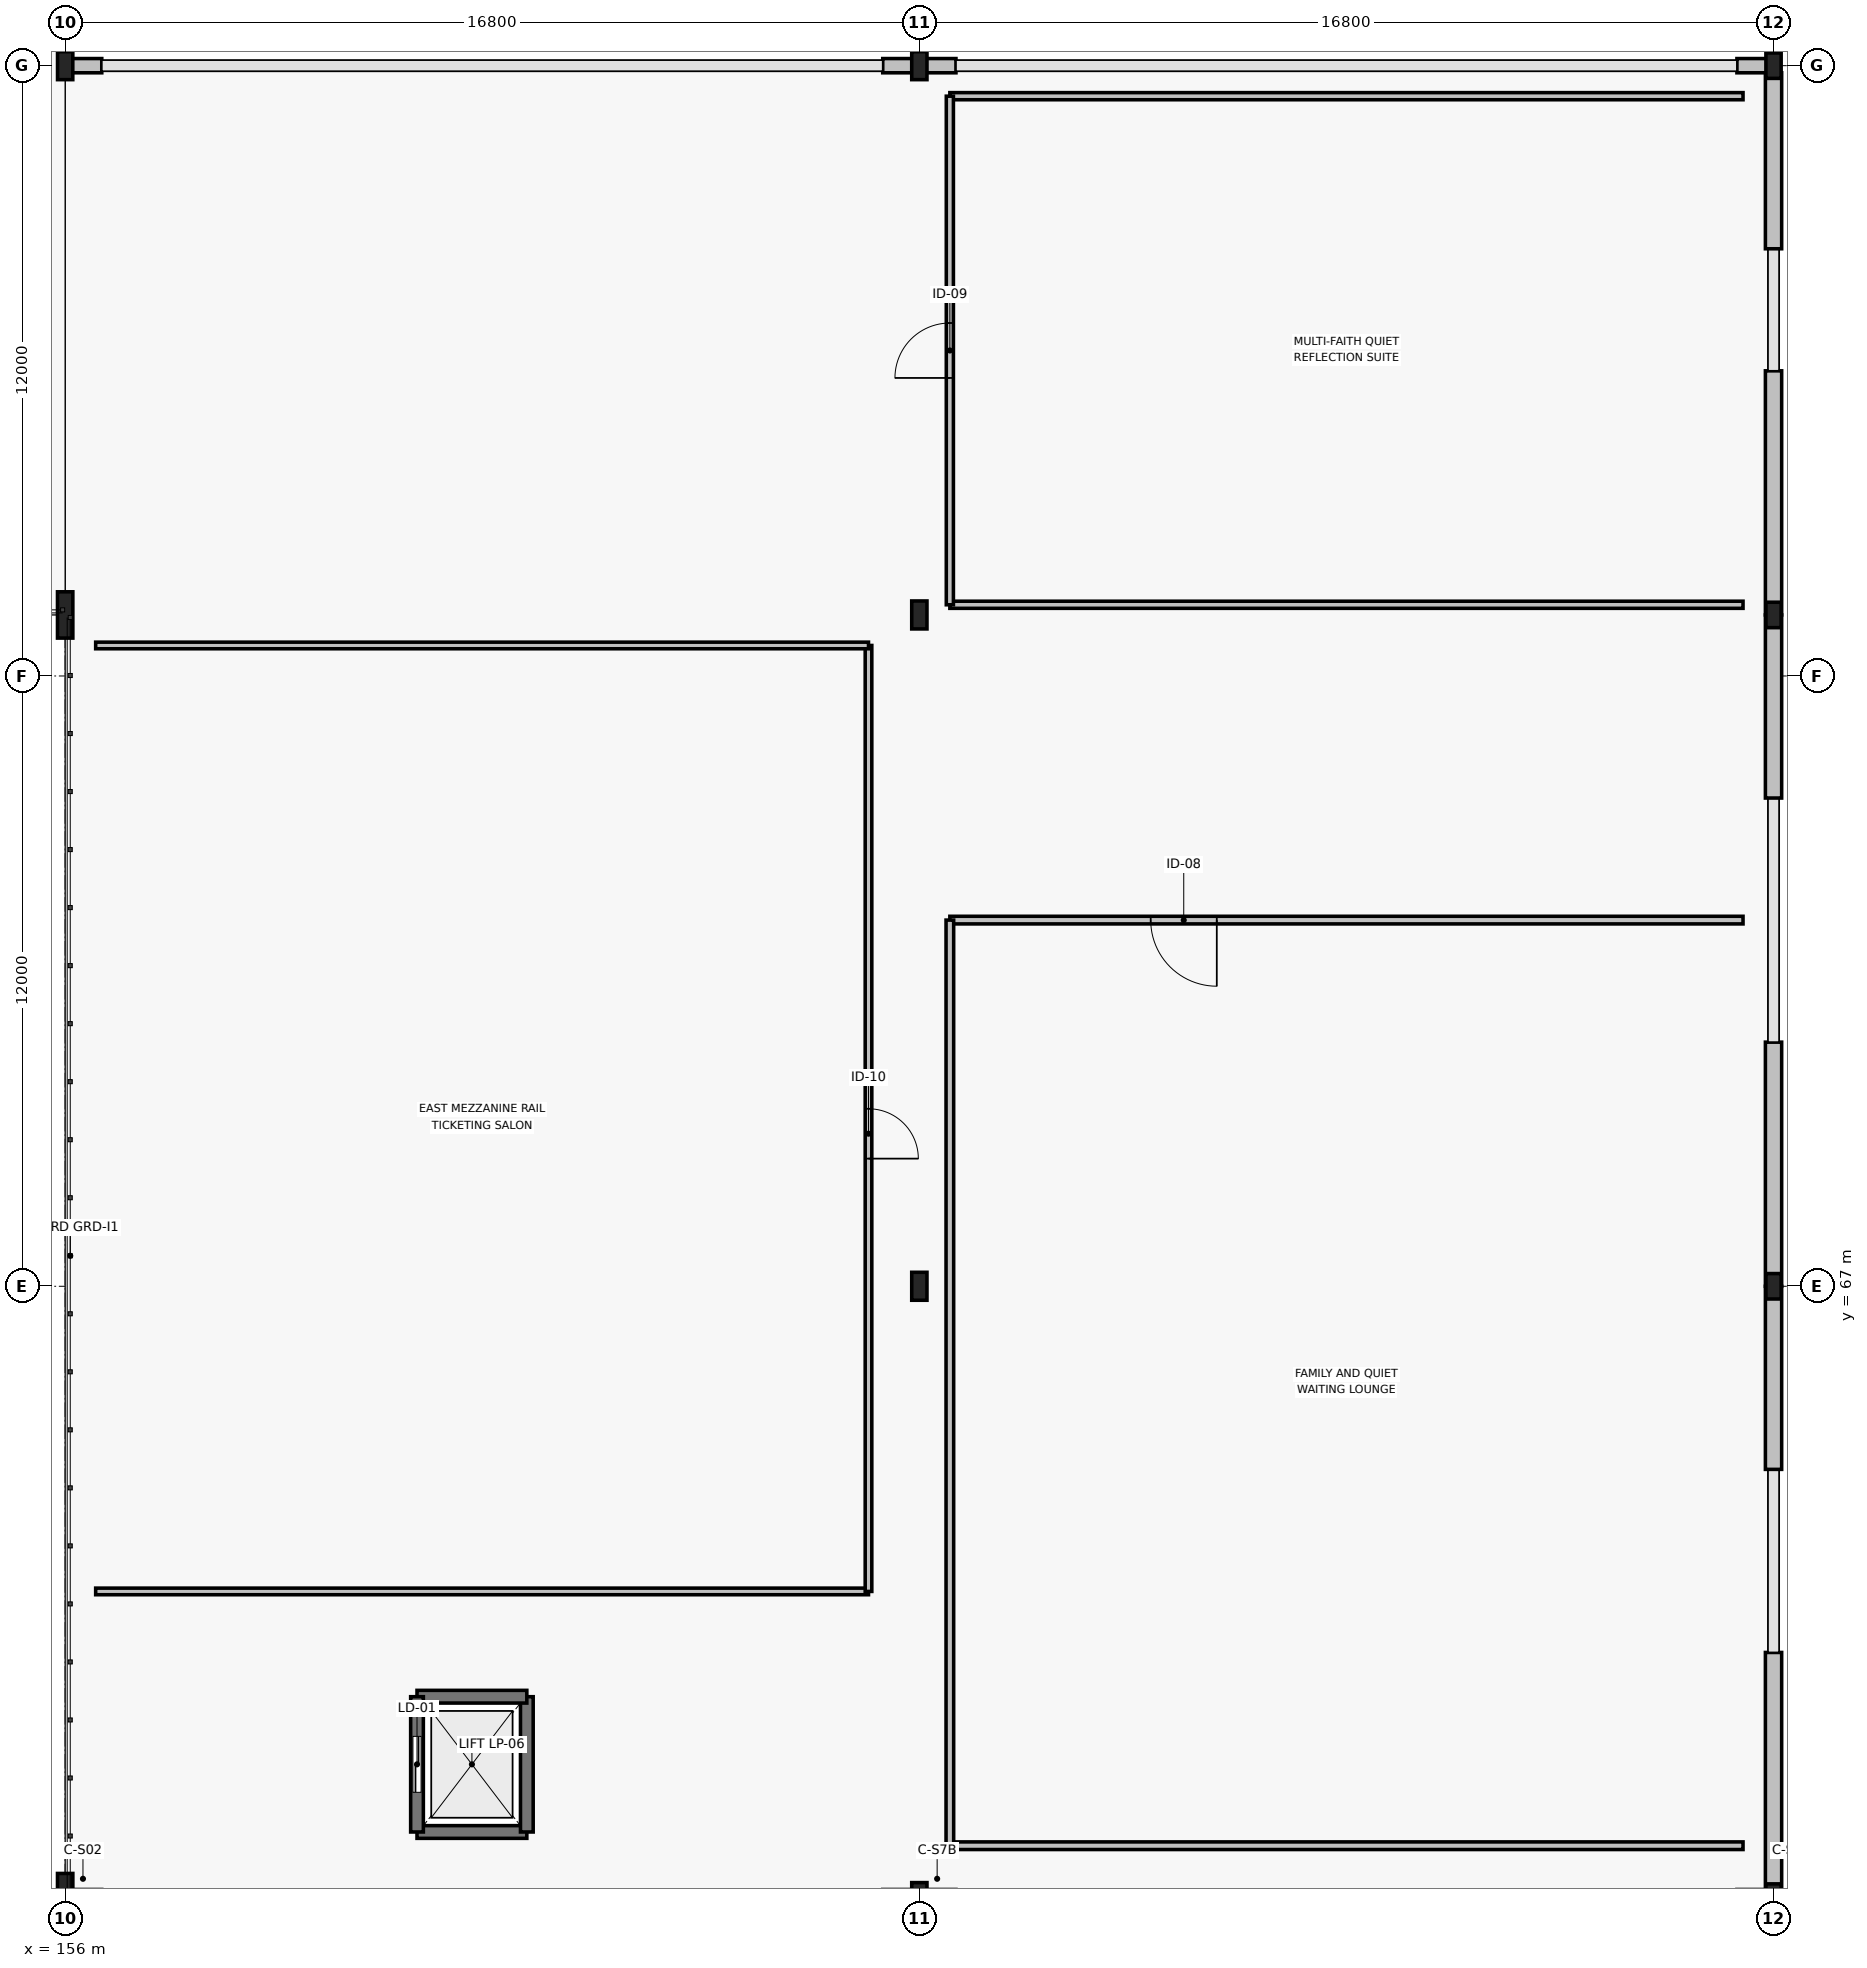
"""IFC4 building model, lengths in metres.
Left out: names, types, materials, properties, quantities, classifications, styles, units other than length and angle.
Written with IfcOpenShell. Run it as: python <this file> out.ifc"""

import sys

from ifc_helpers import new_model, si_unit, direction, frame, frame_2d, origin, origin_2d, place, context, subcontext, project, spatial, rectangle, i_section, extrude, element, fill, save


model = new_model("IFC4")
c1 = context("Model", 3, precision=1e-05, world=origin(), true_north=direction((0.0, 1.0)))
c2 = subcontext(c1, "Body", "Model", "MODEL_VIEW")
j1 = project(units=[si_unit("LENGTHUNIT", "METRE"), si_unit("PLANEANGLEUNIT", "RADIAN")], contexts=[c1])
p1 = place(None, origin())
s1 = spatial("IfcSite", under=j1, at=p1, CompositionType="ELEMENT")
p2 = place(p1, origin())
s2 = spatial("IfcBuilding", under=s1, at=p2, CompositionType="ELEMENT")
p3 = place(p2, frame((0.0, 0.0, 5.4)))
s3 = spatial("IfcBuildingStorey", under=s2, at=p3, CompositionType="ELEMENT", Elevation=5.4)
p4 = place(p3, frame((156.0, 55.0, 0.0), z_axis=(0.0, 0.0, 1.0), x_axis=(1.0, 0.0, 0.0)))
e1 = element("IfcColumn", 1, at=p4, inside=s3, PredefinedType="COLUMN", context=c2, shape_type="SweptSolid", body=[
    extrude(i_section(OverallWidth=0.302, OverallDepth=0.91, WebThickness=0.021, FlangeThickness=0.04, FilletRadius=0.03, at=origin_2d()), origin(), (0.0, 0.0, 1.0), 5.75),
])
p5 = place(p3, frame((172.8, 55.0, 0.0), z_axis=(0.0, 0.0, 1.0), x_axis=(1.0, 0.0, 0.0)))
e2 = element("IfcColumn", 2, at=p5, inside=s3, PredefinedType="COLUMN", context=c2, shape_type="SweptSolid", body=[
    extrude(i_section(OverallWidth=0.3, OverallDepth=0.55, WebThickness=0.015, FlangeThickness=0.029, FilletRadius=0.027, at=origin_2d()), origin(), (0.0, 0.0, 1.0), 5.75),
])
p6 = place(p3, frame((172.8, 67.0, 0.0), z_axis=(0.0, 0.0, 1.0), x_axis=(1.0, 0.0, 0.0)))
e3 = element("IfcColumn", 3, at=p6, inside=s3, PredefinedType="COLUMN", context=c2, shape_type="SweptSolid", body=[
    extrude(i_section(OverallWidth=0.3, OverallDepth=0.55, WebThickness=0.015, FlangeThickness=0.029, FilletRadius=0.027, at=origin_2d()), origin(), (0.0, 0.0, 1.0), 5.4),
])
p7 = place(p3, frame((156.0, 80.2, 0.0), z_axis=(0.0, 0.0, 1.0), x_axis=(1.0, 0.0, 0.0)))
e4 = element("IfcColumn", 4, at=p7, inside=s3, PredefinedType="COLUMN", context=c2, shape_type="SweptSolid", body=[
    extrude(i_section(OverallWidth=0.302, OverallDepth=0.91, WebThickness=0.021, FlangeThickness=0.04, FilletRadius=0.03, at=origin_2d()), origin(), (0.0, 0.0, 1.0), 5.4),
])
for number, where, z_axis, x_axis in (
    (5, (156.0, 91.0, 0.0), (0.0, 0.0, 1.0), (1.0, 0.0, 0.0)),
    (6, (172.8, 80.2, 0.0), (0.0, 0.0, 1.0), (1.0, 0.0, 0.0)),
    (7, (172.8, 91.0, 0.0), (0.0, 0.0, 1.0), (1.0, 0.0, 0.0)),
):
    element("IfcColumn", number, at=place(p3, frame(where, z_axis=z_axis, x_axis=x_axis)), inside=s3, PredefinedType="COLUMN", context=c2, shape_type="SweptSolid", body=[
        extrude(i_section(OverallWidth=0.3, OverallDepth=0.55, WebThickness=0.015, FlangeThickness=0.029, FilletRadius=0.027, at=origin_2d()), origin(), (0.0, 0.0, 1.0), 5.4),
    ])
for number, where, z_axis, x_axis in (
    (8, (189.6, 55.0, 0.0), (0.0, 0.0, 1.0), (1.0, 0.0, 0.0)),
    (9, (189.6, 67.0, 0.0), (0.0, 0.0, 1.0), (1.0, 0.0, 0.0)),
    (10, (189.6, 80.2, 0.0), (0.0, 0.0, 1.0), (1.0, 0.0, 0.0)),
    (11, (189.6, 91.0, 0.0), (0.0, 0.0, 1.0), (1.0, 0.0, 0.0)),
):
    element("IfcColumn", number, at=place(p3, frame(where, z_axis=z_axis, x_axis=x_axis)), inside=s3, PredefinedType="COLUMN", context=c2, shape_type="SweptSolid", body=[
        extrude(i_section(OverallWidth=0.3, OverallDepth=0.5, WebThickness=0.014, FlangeThickness=0.028, FilletRadius=0.027, at=origin_2d()), origin(), (0.0, 0.0, 1.0), 5.4),
    ])
for number, where, z_axis, x_axis in (
    (12, (156.0, 55.0, 0.0), (0.0, 0.0, 1.0), (1.0, 0.0, 0.0)),
    (13, (172.08, 55.0, 0.0), (0.0, 0.0, 1.0), (1.0, 0.0, 0.0)),
):
    element("IfcWall", number, at=place(p3, frame(where, z_axis=z_axis, x_axis=x_axis)), inside=s3, PredefinedType="STANDARD", context=c2, shape_type="SweptSolid", body=[
        extrude(rectangle(XDim=0.72, YDim=0.28, at=frame_2d((0.36, 0.0))), origin(), (0.0, 0.0, 1.0), 5.14),
    ])
for number, where, z_axis, x_axis in (
    (14, (156.0, 91.0, 0.0), (0.0, 0.0, 1.0), (1.0, 0.0, 0.0)),
    (15, (172.08, 91.0, 0.0), (0.0, 0.0, 1.0), (1.0, 0.0, 0.0)),
):
    element("IfcWall", number, at=place(p3, frame(where, z_axis=z_axis, x_axis=x_axis)), inside=s3, PredefinedType="STANDARD", context=c2, shape_type="SweptSolid", body=[
        extrude(rectangle(XDim=0.72, YDim=0.28, at=frame_2d((0.36, 0.0))), origin(), (0.0, 0.0, 1.0), 4.485),
    ])
p8 = place(p3, frame((172.8, 55.0, 0.0), z_axis=(0.0, 0.0, 1.0), x_axis=(1.0, 0.0, 0.0)))
e16 = element("IfcWall", 16, at=p8, inside=s3, PredefinedType="STANDARD", context=c2, shape_type="SweptSolid", body=[
    extrude(rectangle(XDim=0.72, YDim=0.28, at=frame_2d((0.36, 0.0))), origin(), (0.0, 0.0, 1.0), 5.14),
])
p9 = place(p3, frame((188.88, 55.0, 0.0), z_axis=(0.0, 0.0, 1.0), x_axis=(1.0, 0.0, 0.0)))
e17 = element("IfcWall", 17, at=p9, inside=s3, PredefinedType="STANDARD", context=c2, shape_type="SweptSolid", body=[
    extrude(rectangle(XDim=0.72, YDim=0.28, at=frame_2d((0.36, 0.0))), origin(), (0.0, 0.0, 1.0), 5.14),
])
p10 = place(p3, frame((172.8, 91.0, 0.0), z_axis=(0.0, 0.0, 1.0), x_axis=(1.0, 0.0, 0.0)))
e18 = element("IfcWall", 18, at=p10, inside=s3, PredefinedType="STANDARD", context=c2, shape_type="SweptSolid", body=[
    extrude(rectangle(XDim=0.72, YDim=0.28, at=frame_2d((0.36, 0.0))), origin(), (0.0, 0.0, 1.0), 5.14),
])
p11 = place(p3, frame((188.88, 91.0, 0.0), z_axis=(0.0, 0.0, 1.0), x_axis=(1.0, 0.0, 0.0)))
e19 = element("IfcWall", 19, at=p11, inside=s3, PredefinedType="STANDARD", context=c2, shape_type="SweptSolid", body=[
    extrude(rectangle(XDim=0.72, YDim=0.28, at=frame_2d((0.36, 0.0))), origin(), (0.0, 0.0, 1.0), 5.14),
])
p12 = place(p3, frame((189.6, 55.14, 0.0), z_axis=(0.0, 0.0, 1.0), x_axis=(0.0, 1.0, 0.0)))
e20 = element("IfcWall", 20, at=p12, inside=s3, PredefinedType="STANDARD", context=c2, shape_type="SweptSolid", body=[
    extrude(rectangle(XDim=4.66, YDim=0.32, at=frame_2d((2.33, 0.0))), origin(), (0.0, 0.0, 1.0), 4.125),
])
p13 = place(p3, frame((189.6, 63.4, 0.0), z_axis=(0.0, 0.0, 1.0), x_axis=(0.0, 1.0, 0.0)))
e21 = element("IfcWall", 21, at=p13, inside=s3, PredefinedType="STANDARD", context=c2, shape_type="SweptSolid", body=[
    extrude(rectangle(XDim=3.6, YDim=0.32, at=frame_2d((1.8, 0.0))), origin(), (0.0, 0.0, 1.0), 4.125),
])
p14 = place(p3, frame((189.6, 67.0, 0.0), z_axis=(0.0, 0.0, 1.0), x_axis=(0.0, 1.0, 0.0)))
e22 = element("IfcWall", 22, at=p14, inside=s3, PredefinedType="STANDARD", context=c2, shape_type="SweptSolid", body=[
    extrude(rectangle(XDim=4.8, YDim=0.32, at=frame_2d((2.4, 0.0))), origin(), (0.0, 0.0, 1.0), 4.125),
])
p15 = place(p3, frame((189.6, 76.6, 0.0), z_axis=(0.0, 0.0, 1.0), x_axis=(0.0, 1.0, 0.0)))
e23 = element("IfcWall", 23, at=p15, inside=s3, PredefinedType="STANDARD", context=c2, shape_type="SweptSolid", body=[
    extrude(rectangle(XDim=3.6, YDim=0.32, at=frame_2d((1.8, 0.0))), origin(), (0.0, 0.0, 1.0), 4.125),
])
p16 = place(p3, frame((189.6, 80.2, 0.0), z_axis=(0.0, 0.0, 1.0), x_axis=(0.0, 1.0, 0.0)))
e24 = element("IfcWall", 24, at=p16, inside=s3, PredefinedType="STANDARD", context=c2, shape_type="SweptSolid", body=[
    extrude(rectangle(XDim=4.8, YDim=0.32, at=frame_2d((2.4, 0.0))), origin(), (0.0, 0.0, 1.0), 4.125),
])
p17 = place(p3, frame((189.6, 87.4, 0.0), z_axis=(0.0, 0.0, 1.0), x_axis=(0.0, 1.0, 0.0)))
e25 = element("IfcWall", 25, at=p17, inside=s3, PredefinedType="STANDARD", context=c2, shape_type="SweptSolid", body=[
    extrude(rectangle(XDim=3.46, YDim=0.32, at=frame_2d((1.73, 0.0))), origin(), (0.0, 0.0, 1.0), 4.125),
])
p18 = place(p3, frame((156.0, 91.14, 0.0), z_axis=(0.0, 0.0, 1.0), x_axis=(0.0, 1.0, 0.0)))
e26 = element("IfcWall", 26, at=p18, inside=s3, PredefinedType="STANDARD", context=c2, shape_type="SweptSolid", body=[
    extrude(rectangle(XDim=5.66, YDim=0.28, at=frame_2d((2.83, 0.0))), origin(), (0.0, 0.0, 1.0), 4.125),
])
p19 = place(p3, frame((162.92, 56.27, 0.0), z_axis=(0.0, 0.0, 1.0), x_axis=(1.0, 0.0, 0.0)))
e27 = element("IfcWall", 27, at=p19, inside=s3, PredefinedType="SHEAR", context=c2, shape_type="SweptSolid", body=[
    extrude(rectangle(XDim=2.16, YDim=0.25, at=frame_2d((1.08, 0.0))), origin(), (0.0, 0.0, 1.0), 5.14),
])
p20 = place(p3, frame((165.08, 56.27, 0.0), z_axis=(0.0, 0.0, 1.0), x_axis=(0.0, 1.0, 0.0)))
e28 = element("IfcWall", 28, at=p20, inside=s3, PredefinedType="SHEAR", context=c2, shape_type="SweptSolid", body=[
    extrude(rectangle(XDim=2.66, YDim=0.25, at=frame_2d((1.33, 0.0))), origin(), (0.0, 0.0, 1.0), 5.14),
])
p21 = place(p3, frame((165.08, 58.93, 0.0), z_axis=(0.0, 0.0, 1.0), x_axis=(-1.0, 0.0, 0.0)))
e29 = element("IfcWall", 29, at=p21, inside=s3, PredefinedType="SHEAR", context=c2, shape_type="SweptSolid", body=[
    extrude(rectangle(XDim=2.16, YDim=0.25, at=frame_2d((1.08, 0.0))), origin(), (0.0, 0.0, 1.0), 5.14),
])
p22 = place(p3, frame((162.92, 58.93, 0.0), z_axis=(0.0, 0.0, 1.0), x_axis=(0.0, -1.0, 0.0)))
e30 = element("IfcWall", 30, at=p22, inside=s3, PredefinedType="SHEAR", context=c2, shape_type="SweptSolid", body=[
    extrude(rectangle(XDim=2.66, YDim=0.25, at=frame_2d((1.33, 0.0))), origin(), (0.0, 0.0, 1.0), 5.14),
])
p23 = place(p22, frame((0.78, 0.0, 0.0)))
e31 = element("IfcOpeningElement", 31, at=p23, cuts=e30, PredefinedType="OPENING", context=c2, shape_type="SweptSolid", body=[
    extrude(rectangle(XDim=1.1, YDim=2.2, at=frame_2d((0.55, 1.1))), frame((0.0, 0.135, 0.0), z_axis=(0.0, -1.0, 0.0), x_axis=(1.0, 0.0, 0.0)), (0.0, 0.0, 1.0), 0.27),
])
p24 = place(p3, frame((173.4, 56.0, 0.0), z_axis=(0.0, 0.0, 1.0), x_axis=(1.0, 0.0, 0.0)))
e32 = element("IfcWall", 32, at=p24, inside=s3, PredefinedType="PARTITIONING", context=c2, shape_type="SweptSolid", body=[
    extrude(rectangle(XDim=15.6, YDim=0.15, at=frame_2d((7.8, 0.0))), origin(), (0.0, 0.0, 1.0), 5.16),
])
p25 = place(p3, frame((189.0, 74.2, 0.0), z_axis=(0.0, 0.0, 1.0), x_axis=(-1.0, 0.0, 0.0)))
e33 = element("IfcWall", 33, at=p25, inside=s3, PredefinedType="PARTITIONING", context=c2, shape_type="SweptSolid", body=[
    extrude(rectangle(XDim=15.6, YDim=0.15, at=frame_2d((7.8, 0.0))), origin(), (0.0, 0.0, 1.0), 5.16),
])
p26 = place(p25, frame((10.35, 0.0, 0.0)))
e34 = element("IfcOpeningElement", 34, at=p26, cuts=e33, PredefinedType="OPENING", context=c2, shape_type="SweptSolid", body=[
    extrude(rectangle(XDim=1.3, YDim=2.15, at=frame_2d((0.65, 1.075))), frame((0.0, 0.085, 0.0), z_axis=(0.0, -1.0, 0.0), x_axis=(1.0, 0.0, 0.0)), (0.0, 0.0, 1.0), 0.17),
])
p27 = place(p3, frame((173.4, 74.2, 0.0), z_axis=(0.0, 0.0, 1.0), x_axis=(0.0, -1.0, 0.0)))
e35 = element("IfcWall", 35, at=p27, inside=s3, PredefinedType="PARTITIONING", context=c2, shape_type="SweptSolid", body=[
    extrude(rectangle(XDim=18.2, YDim=0.15, at=frame_2d((9.1, 0.0))), origin(), (0.0, 0.0, 1.0), 4.125),
])
for number, where, z_axis, x_axis in (
    (36, (173.4, 80.4, 0.0), (0.0, 0.0, 1.0), (1.0, 0.0, 0.0)),
    (37, (189.0, 90.4, 0.0), (0.0, 0.0, 1.0), (-1.0, 0.0, 0.0)),
):
    element("IfcWall", number, at=place(p3, frame(where, z_axis=z_axis, x_axis=x_axis)), inside=s3, PredefinedType="PARTITIONING", context=c2, shape_type="SweptSolid", body=[
        extrude(rectangle(XDim=15.6, YDim=0.14, at=frame_2d((7.8, 0.0))), origin(), (0.0, 0.0, 1.0), 5.16),
    ])
p28 = place(p3, frame((173.4, 90.4, 0.0), z_axis=(0.0, 0.0, 1.0), x_axis=(0.0, -1.0, 0.0)))
e38 = element("IfcWall", 38, at=p28, inside=s3, PredefinedType="PARTITIONING", context=c2, shape_type="SweptSolid", body=[
    extrude(rectangle(XDim=10.0, YDim=0.14, at=frame_2d((5.0, 0.0))), origin(), (0.0, 0.0, 1.0), 4.125),
])
p29 = place(p28, frame((4.46, 0.0, 0.0)))
e39 = element("IfcOpeningElement", 39, at=p29, cuts=e38, PredefinedType="OPENING", context=c2, shape_type="SweptSolid", body=[
    extrude(rectangle(XDim=1.08, YDim=2.1, at=frame_2d((0.54, 1.05))), frame((0.0, 0.08, 0.0), z_axis=(0.0, -1.0, 0.0), x_axis=(1.0, 0.0, 0.0)), (0.0, 0.0, 1.0), 0.16),
])
p30 = place(p3, frame((156.6, 61.0, 0.0), z_axis=(0.0, 0.0, 1.0), x_axis=(1.0, 0.0, 0.0)))
e40 = element("IfcWall", 40, at=p30, inside=s3, PredefinedType="PARTITIONING", context=c2, shape_type="SweptSolid", body=[
    extrude(rectangle(XDim=15.2, YDim=0.13, at=frame_2d((7.6, 0.0))), origin(), (0.0, 0.0, 1.0), 4.125),
])
p31 = place(p3, frame((171.8, 61.0, 0.0), z_axis=(0.0, 0.0, 1.0), x_axis=(0.0, 1.0, 0.0)))
e41 = element("IfcWall", 41, at=p31, inside=s3, PredefinedType="PARTITIONING", context=c2, shape_type="SweptSolid", body=[
    extrude(rectangle(XDim=18.6, YDim=0.13, at=frame_2d((9.3, 0.0))), origin(), (0.0, 0.0, 1.0), 5.16),
])
p32 = place(p31, frame((9.49, 0.0, 0.0), z_axis=(0.0, 0.0, 1.0), x_axis=(-1.0, 0.0, 0.0)))
e42 = element("IfcOpeningElement", 42, at=p32, cuts=e41, PredefinedType="OPENING", context=c2, shape_type="SweptSolid", body=[
    extrude(rectangle(XDim=0.98, YDim=2.1, at=frame_2d((0.49, 1.05))), frame((0.0, 0.075, 0.0), z_axis=(0.0, -1.0, 0.0), x_axis=(1.0, 0.0, 0.0)), (0.0, 0.0, 1.0), 0.15),
])
p33 = place(p3, frame((171.8, 79.6, 0.0), z_axis=(0.0, 0.0, 1.0), x_axis=(-1.0, 0.0, 0.0)))
e43 = element("IfcWall", 43, at=p33, inside=s3, PredefinedType="PARTITIONING", context=c2, shape_type="SweptSolid", body=[
    extrude(rectangle(XDim=15.2, YDim=0.13, at=frame_2d((7.6, 0.0))), origin(), (0.0, 0.0, 1.0), 4.125),
])
p34 = place(p23, origin())
e44 = element("IfcDoor", 44, at=p34, inside=s3, OperationType="SLIDING_TO_LEFT", PredefinedType="DOOR", context=c2, shape_type="SweptSolid", body=[
    extrude(rectangle(XDim=1.1, YDim=2.2, at=frame_2d((0.55, 1.1))), frame((0.0, 0.025, 0.0), z_axis=(0.0, -1.0, 0.0), x_axis=(1.0, 0.0, 0.0)), (0.0, 0.0, 1.0), 0.05),
])
fill(e31, e44)
p35 = place(p26, origin())
e45 = element("IfcDoor", 45, at=p35, inside=s3, OperationType="SINGLE_SWING_LEFT", PredefinedType="DOOR", context=c2, shape_type="SweptSolid", body=[
    extrude(rectangle(XDim=1.3, YDim=2.15, at=frame_2d((0.65, 1.075))), frame((0.0, 0.025, 0.0), z_axis=(0.0, -1.0, 0.0), x_axis=(1.0, 0.0, 0.0)), (0.0, 0.0, 1.0), 0.05),
])
fill(e34, e45)
p36 = place(p29, origin())
e46 = element("IfcDoor", 46, at=p36, inside=s3, OperationType="SINGLE_SWING_RIGHT", PredefinedType="DOOR", context=c2, shape_type="SweptSolid", body=[
    extrude(rectangle(XDim=1.08, YDim=2.1, at=frame_2d((0.54, 1.05))), frame((0.0, 0.025, 0.0), z_axis=(0.0, -1.0, 0.0), x_axis=(1.0, 0.0, 0.0)), (0.0, 0.0, 1.0), 0.05),
])
fill(e39, e46)
p37 = place(p32, origin())
e47 = element("IfcDoor", 47, at=p37, inside=s3, OperationType="SINGLE_SWING_LEFT", PredefinedType="DOOR", context=c2, shape_type="SweptSolid", body=[
    extrude(rectangle(XDim=0.98, YDim=2.1, at=frame_2d((0.49, 1.05))), frame((0.0, 0.025, 0.0), z_axis=(0.0, -1.0, 0.0), x_axis=(1.0, 0.0, 0.0)), (0.0, 0.0, 1.0), 0.05),
])
fill(e42, e47)
save(model, sys.argv[1])
